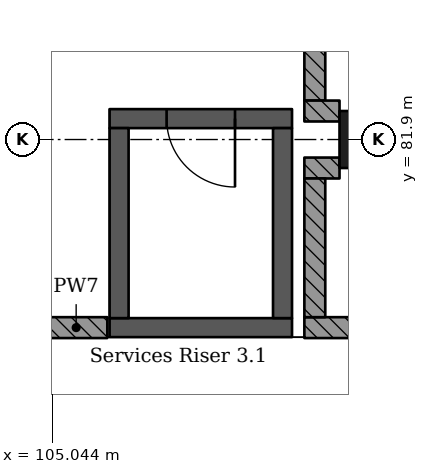
"""IFC4 building model, lengths in metres.
Left out: names, types, materials, properties, quantities, classifications, styles, units other than length and angle.
Written with IfcOpenShell. Run it as: python <this file> out.ifc"""

import sys

from ifc_helpers import new_model, si_unit, direction, frame, frame_2d, origin, origin_2d, place, context, subcontext, project, spatial, rectangle, extrude, element, fill, save


model = new_model("IFC4")
c1 = context("Model", 3, precision=1e-05, world=origin(), true_north=direction((0.0, 1.0)))
c2 = subcontext(c1, "Body", "Model", "MODEL_VIEW")
j1 = project(units=[si_unit("LENGTHUNIT", "METRE"), si_unit("PLANEANGLEUNIT", "RADIAN")], contexts=[c1])
p1 = place(None, origin())
s1 = spatial("IfcSite", under=j1, at=p1, CompositionType="ELEMENT")
p2 = place(p1, origin())
s2 = spatial("IfcBuilding", under=s1, at=p2, CompositionType="ELEMENT")
p3 = place(p2, frame((0.0, 0.0, 10.92)))
s3 = spatial("IfcBuildingStorey", under=s2, at=p3, CompositionType="ELEMENT", Elevation=10.92)
p4 = place(p3, frame((109.2, 81.9, 0.0), z_axis=(0.0, 0.0, 1.0), x_axis=(1.0, 0.0, 0.0)))
e1 = element("IfcColumn", 1, at=p4, inside=s3, PredefinedType="COLUMN", context=c2, shape_type="SweptSolid", body=[
    extrude(rectangle(XDim=0.75, YDim=0.75, at=origin_2d()), origin(), (0.0, 0.0, 1.0), 4.55),
])
p5 = place(p3, frame((108.2, 79.425, 0.0), z_axis=(0.0, 0.0, 1.0), x_axis=(-1.0, 0.0, 0.0)))
e2 = element("IfcWall", 2, at=p5, inside=s3, PredefinedType="SHEAR", context=c2, shape_type="SweptSolid", body=[
    extrude(rectangle(XDim=2.4, YDim=0.25, at=frame_2d((1.2, 0.0))), origin(), (0.0, 0.0, 1.0), 4.55),
])
p6 = place(p3, frame((108.2, 82.175, 0.0), z_axis=(0.0, 0.0, 1.0), x_axis=(-1.0, 0.0, 0.0)))
e3 = element("IfcWall", 3, at=p6, inside=s3, PredefinedType="SHEAR", context=c2, shape_type="SweptSolid", body=[
    extrude(rectangle(XDim=2.4, YDim=0.25, at=frame_2d((1.2, 0.0))), origin(), (0.0, 0.0, 1.0), 4.55),
])
p7 = place(p6, frame((0.75, 0.0, 0.0)))
e4 = element("IfcOpeningElement", 4, at=p7, cuts=e3, PredefinedType="OPENING", context=c2, shape_type="SweptSolid", body=[
    extrude(rectangle(XDim=0.9, YDim=2.1, at=frame_2d((0.45, 1.05))), frame((0.0, 0.135, 0.0), z_axis=(0.0, -1.0, 0.0), x_axis=(1.0, 0.0, 0.0)), (0.0, 0.0, 1.0), 0.27),
])
for number, where, z_axis, x_axis in (
    (5, (105.925, 82.05, 0.0), (0.0, 0.0, 1.0), (0.0, -1.0, 0.0)),
    (6, (108.075, 82.05, 0.0), (0.0, 0.0, 1.0), (0.0, -1.0, 0.0)),
):
    element("IfcWall", number, at=place(p3, frame(where, z_axis=z_axis, x_axis=x_axis)), inside=s3, PredefinedType="SHEAR", context=c2, shape_type="SweptSolid", body=[
        extrude(rectangle(XDim=2.5, YDim=0.25, at=frame_2d((1.25, 0.0))), origin(), (0.0, 0.0, 1.0), 4.55),
    ])
p8 = place(p3, frame((105.77, 79.425, 0.0), z_axis=(0.0, 0.0, 1.0), x_axis=(-1.0, 0.0, 0.0)))
e7 = element("IfcWall", 7, at=p8, inside=s3, PredefinedType="SOLIDWALL", context=c2, shape_type="SweptSolid", body=[
    extrude(rectangle(XDim=0.82, YDim=0.275, at=frame_2d((0.41, 0.0))), origin(), (0.0, 0.0, 1.0), 4.25),
])
p9 = place(p3, frame((108.363, 79.425, 0.0), z_axis=(0.0, 0.0, 1.0), x_axis=(1.0, 0.0, 0.0)))
e8 = element("IfcWall", 8, at=p9, inside=s3, PredefinedType="SOLIDWALL", context=c2, shape_type="SweptSolid", body=[
    extrude(rectangle(XDim=3.975, YDim=0.275, at=frame_2d((1.987, 0.0))), origin(), (0.0, 0.0, 1.0), 4.25),
])
p10 = place(p3, frame((108.363, 81.525, 0.0), z_axis=(0.0, 0.0, 1.0), x_axis=(1.0, 0.0, 0.0)))
e9 = element("IfcWall", 9, at=p10, inside=s3, PredefinedType="SOLIDWALL", context=c2, shape_type="SweptSolid", body=[
    extrude(rectangle(XDim=0.462, YDim=0.275, at=frame_2d((0.231, 0.0))), origin(), (0.0, 0.0, 1.0), 4.25),
])
p11 = place(p3, frame((108.5, 79.562, 0.0), z_axis=(0.0, 0.0, 1.0), x_axis=(0.0, 1.0, 0.0)))
e10 = element("IfcWall", 10, at=p11, inside=s3, PredefinedType="SOLIDWALL", context=c2, shape_type="SweptSolid", body=[
    extrude(rectangle(XDim=1.825, YDim=0.275, at=frame_2d((0.913, 0.0))), origin(), (0.0, 0.0, 1.0), 4.25),
])
p12 = place(p3, frame((108.5, 82.413, 0.0), z_axis=(0.0, 0.0, 1.0), x_axis=(0.0, 1.0, 0.0)))
e11 = element("IfcWall", 11, at=p12, inside=s3, PredefinedType="SOLIDWALL", context=c2, shape_type="SweptSolid", body=[
    extrude(rectangle(XDim=6.85, YDim=0.275, at=frame_2d((3.425, 0.0))), origin(), (0.0, 0.0, 1.0), 4.25),
])
p13 = place(p3, frame((108.825, 82.275, 0.0), z_axis=(0.0, 0.0, 1.0), x_axis=(-1.0, 0.0, 0.0)))
e12 = element("IfcWall", 12, at=p13, inside=s3, PredefinedType="SOLIDWALL", context=c2, shape_type="SweptSolid", body=[
    extrude(rectangle(XDim=0.462, YDim=0.275, at=frame_2d((0.231, 0.0))), origin(), (0.0, 0.0, 1.0), 4.25),
])
p14 = place(p7, origin())
e13 = element("IfcDoor", 13, at=p14, inside=s3, OperationType="SINGLE_SWING_RIGHT", PredefinedType="DOOR", context=c2, shape_type="SweptSolid", body=[
    extrude(rectangle(XDim=0.9, YDim=2.1, at=frame_2d((0.45, 1.05))), frame((0.0, 0.025, 0.0), z_axis=(0.0, -1.0, 0.0), x_axis=(1.0, 0.0, 0.0)), (0.0, 0.0, 1.0), 0.05),
])
fill(e4, e13)
save(model, sys.argv[1])
